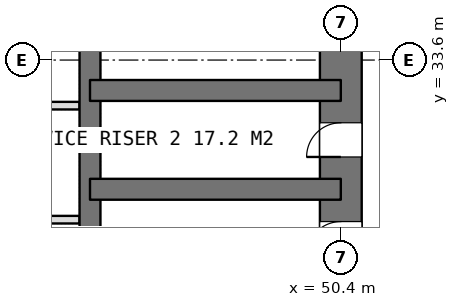
"""IFC4 building model, lengths in metres.
Left out: names, types, materials, properties, quantities, classifications, styles, units other than length and angle.
Written with IfcOpenShell. Run it as: python <this file> out.ifc"""

import sys

from ifc_helpers import new_model, si_unit, direction, frame, frame_2d, origin, place, context, subcontext, project, spatial, rectangle, extrude, element, fill, save


model = new_model("IFC4")
c1 = context("Model", 3, precision=1e-05, world=origin(), true_north=direction((0.0, 1.0)))
c2 = subcontext(c1, "Body", "Model", "MODEL_VIEW")
j1 = project(units=[si_unit("LENGTHUNIT", "METRE"), si_unit("PLANEANGLEUNIT", "RADIAN")], contexts=[c1])
p1 = place(None, origin())
s1 = spatial("IfcSite", under=j1, at=p1, CompositionType="ELEMENT")
p2 = place(p1, origin())
s2 = spatial("IfcBuilding", under=s1, at=p2, CompositionType="ELEMENT")
p3 = place(p2, frame((0.0, 0.0, 74.15)))
s3 = spatial("IfcBuildingStorey", under=s2, at=p3, CompositionType="ELEMENT", Elevation=74.15)
p4 = place(p3, frame((50.4, 21.0, 0.0), z_axis=(0.0, 0.0, 1.0), x_axis=(0.0, 1.0, 0.0)))
e1 = element("IfcWall", 1, at=p4, inside=s3, PredefinedType="SHEAR", context=c2, shape_type="SweptSolid", body=[
    extrude(rectangle(XDim=25.2, YDim=1.1, at=frame_2d((12.6, 0.0))), origin(), (0.0, 0.0, 1.0), 3.75),
])
p5 = place(p4, frame((16.2, 0.0, 0.0)))
e2 = element("IfcOpeningElement", 2, at=p5, cuts=e1, PredefinedType="OPENING", context=c2, shape_type="SweptSolid", body=[
    extrude(rectangle(XDim=1.2, YDim=2.1, at=frame_2d((0.6, 1.05))), frame((0.0, 0.56, 0.0), z_axis=(0.0, -1.0, 0.0), x_axis=(1.0, 0.0, 0.0)), (0.0, 0.0, 1.0), 1.12),
])
p6 = place(p4, frame((10.05, 0.0, 0.0)))
e3 = element("IfcOpeningElement", 3, at=p6, cuts=e1, PredefinedType="OPENING", context=c2, shape_type="SweptSolid", body=[
    extrude(rectangle(XDim=0.9, YDim=2.1, at=frame_2d((0.45, 1.05))), frame((0.0, 0.56, 0.0), z_axis=(0.0, -1.0, 0.0), x_axis=(1.0, 0.0, 0.0)), (0.0, 0.0, 1.0), 1.12),
])
p7 = place(p4, frame((7.45, 0.0, 0.0)))
e4 = element("IfcOpeningElement", 4, at=p7, cuts=e1, PredefinedType="OPENING", context=c2, shape_type="SweptSolid", body=[
    extrude(rectangle(XDim=0.9, YDim=2.1, at=frame_2d((0.45, 1.05))), frame((0.0, 0.56, 0.0), z_axis=(0.0, -1.0, 0.0), x_axis=(1.0, 0.0, 0.0)), (0.0, 0.0, 1.0), 1.12),
])
p8 = place(p4, frame((0.75, 0.0, 0.0)))
e5 = element("IfcOpeningElement", 5, at=p8, cuts=e1, PredefinedType="OPENING", context=c2, shape_type="SweptSolid", body=[
    extrude(rectangle(XDim=1.2, YDim=2.1, at=frame_2d((0.6, 1.05))), frame((0.0, 0.56, 0.0), z_axis=(0.0, -1.0, 0.0), x_axis=(1.0, 0.0, 0.0)), (0.0, 0.0, 1.0), 1.12),
])
p9 = place(p3, frame((43.8, 21.0, 0.0), z_axis=(0.0, 0.0, 1.0), x_axis=(0.0, 1.0, 0.0)))
e6 = element("IfcWall", 6, at=p9, inside=s3, PredefinedType="SHEAR", context=c2, shape_type="SweptSolid", body=[
    extrude(rectangle(XDim=25.2, YDim=0.55, at=frame_2d((12.6, 0.0))), origin(), (0.0, 0.0, 1.0), 3.75),
])
for number, where, z_axis, x_axis in (
    (7, (43.8, 30.2, 0.0), (0.0, 0.0, 1.0), (1.0, 0.0, 0.0)),
    (8, (43.8, 32.8, 0.0), (0.0, 0.0, 1.0), (1.0, 0.0, 0.0)),
):
    element("IfcWall", number, at=place(p3, frame(where, z_axis=z_axis, x_axis=x_axis)), inside=s3, PredefinedType="SHEAR", context=c2, shape_type="SweptSolid", body=[
        extrude(rectangle(XDim=6.6, YDim=0.55, at=frame_2d((3.3, 0.0))), origin(), (0.0, 0.0, 1.0), 3.75),
    ])
for number, where, z_axis, x_axis in (
    (9, (40.5, 29.4, 0.0), (0.0, 0.0, 1.0), (1.0, 0.0, 0.0)),
    (10, (40.5, 32.4, 0.0), (0.0, 0.0, 1.0), (1.0, 0.0, 0.0)),
):
    element("IfcWall", number, at=place(p3, frame(where, z_axis=z_axis, x_axis=x_axis)), inside=s3, PredefinedType="PARTITIONING", context=c2, shape_type="SweptSolid", body=[
        extrude(rectangle(XDim=3.025, YDim=0.2, at=frame_2d((1.512, 0.0))), origin(), (0.0, 0.0, 1.0), 3.5),
    ])
p10 = place(p6, origin())
e11 = element("IfcDoor", 11, at=p10, inside=s3, OperationType="SINGLE_SWING_LEFT", PredefinedType="DOOR", context=c2, shape_type="SweptSolid", body=[
    extrude(rectangle(XDim=0.9, YDim=2.1, at=frame_2d((0.45, 1.05))), frame((0.0, 0.025, 0.0), z_axis=(0.0, -1.0, 0.0), x_axis=(1.0, 0.0, 0.0)), (0.0, 0.0, 1.0), 0.05),
])
fill(e3, e11)
p11 = place(p7, origin())
e12 = element("IfcDoor", 12, at=p11, inside=s3, OperationType="SINGLE_SWING_LEFT", PredefinedType="DOOR", context=c2, shape_type="SweptSolid", body=[
    extrude(rectangle(XDim=0.9, YDim=2.1, at=frame_2d((0.45, 1.05))), frame((0.0, 0.025, 0.0), z_axis=(0.0, -1.0, 0.0), x_axis=(1.0, 0.0, 0.0)), (0.0, 0.0, 1.0), 0.05),
])
fill(e4, e12)
save(model, sys.argv[1])
